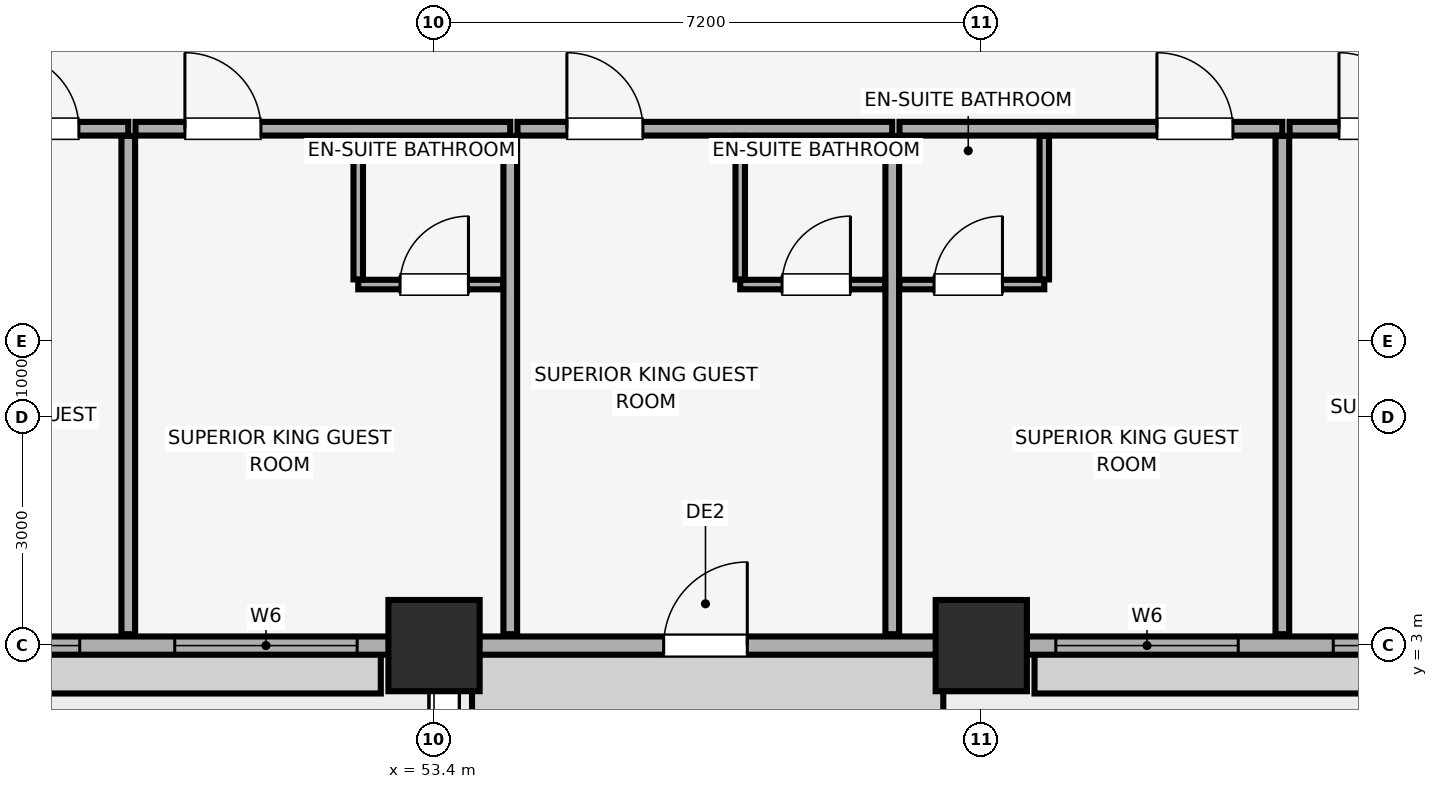
"""IFC4 building model, lengths in metres.
Left out: names, types, materials, properties, quantities, classifications, styles, units other than length and angle.
Written with IfcOpenShell. Run it as: python <this file> out.ifc"""

import sys

from ifc_helpers import new_model, si_unit, direction, frame, frame_2d, origin, origin_2d, place, context, subcontext, project, spatial, rectangle, extrude, element, fill, save


model = new_model("IFC4")
c1 = context("Model", 3, precision=1e-05, world=origin(), true_north=direction((0.0, 1.0)))
c2 = subcontext(c1, "Body", "Model", "MODEL_VIEW")
j1 = project(units=[si_unit("LENGTHUNIT", "METRE"), si_unit("PLANEANGLEUNIT", "RADIAN")], contexts=[c1])
p1 = place(None, origin())
s1 = spatial("IfcSite", under=j1, at=p1, CompositionType="ELEMENT")
p2 = place(p1, origin())
s2 = spatial("IfcBuilding", under=s1, at=p2, CompositionType="ELEMENT")
p3 = place(p2, frame((0.0, 0.0, 135.35)))
s3 = spatial("IfcBuildingStorey", under=s2, at=p3, CompositionType="ELEMENT", Elevation=135.35)
for number, where, z_axis, x_axis in (
    (1, (53.4, 3.0, 0.0), (0.0, 0.0, 1.0), (1.0, 0.0, 0.0)),
    (2, (60.6, 3.0, 0.0), (0.0, 0.0, 1.0), (1.0, 0.0, 0.0)),
):
    element("IfcColumn", number, at=place(p3, frame(where, z_axis=z_axis, x_axis=x_axis)), inside=s3, PredefinedType="COLUMN", context=c2, shape_type="SweptSolid", body=[
        extrude(rectangle(XDim=1.2, YDim=1.2, at=origin_2d()), origin(), (0.0, 0.0, 1.0), 3.56),
    ])
p4 = place(p3, frame((7.0, 3.0, 0.0), z_axis=(0.0, 0.0, 1.0), x_axis=(1.0, 0.0, 0.0)))
e3 = element("IfcWall", 3, at=p4, inside=s3, PredefinedType="SOLIDWALL", context=c2, shape_type="SweptSolid", body=[
    extrude(rectangle(XDim=70.0, YDim=0.24, at=frame_2d((35.0, 0.0))), origin(), (0.0, 0.0, 1.0), 2.61),
])
p5 = place(p4, frame((19.517, 0.0, 0.0)))
e4 = element("IfcOpeningElement", 4, at=p5, cuts=e3, PredefinedType="OPENING", context=c2, shape_type="SweptSolid", body=[
    extrude(rectangle(XDim=1.1, YDim=2.15, at=frame_2d((0.55, 1.075))), frame((0.0, 0.13, 0.0), z_axis=(0.0, -1.0, 0.0), x_axis=(1.0, 0.0, 0.0)), (0.0, 0.0, 1.0), 0.26),
])
p6 = place(p4, frame((34.45, 0.0, 0.0)))
e5 = element("IfcOpeningElement", 5, at=p6, cuts=e3, PredefinedType="OPENING", context=c2, shape_type="SweptSolid", body=[
    extrude(rectangle(XDim=1.1, YDim=2.15, at=frame_2d((0.55, 1.075))), frame((0.0, 0.13, 0.0), z_axis=(0.0, -1.0, 0.0), x_axis=(1.0, 0.0, 0.0)), (0.0, 0.0, 1.0), 0.26),
])
p7 = place(p4, frame((49.421, 0.0, 0.0)))
e6 = element("IfcOpeningElement", 6, at=p7, cuts=e3, PredefinedType="OPENING", context=c2, shape_type="SweptSolid", body=[
    extrude(rectangle(XDim=1.1, YDim=2.15, at=frame_2d((0.55, 1.075))), frame((0.0, 0.13, 0.0), z_axis=(0.0, -1.0, 0.0), x_axis=(1.0, 0.0, 0.0)), (0.0, 0.0, 1.0), 0.26),
])
p8 = place(p4, frame((5.2, 0.0, 0.85)))
e7 = element("IfcOpeningElement", 7, at=p8, cuts=e3, PredefinedType="OPENING", context=c2, shape_type="SweptSolid", body=[
    extrude(rectangle(XDim=1.5, YDim=1.4, at=frame_2d((0.75, 0.7))), frame((0.0, 0.13, 0.0), z_axis=(0.0, -1.0, 0.0), x_axis=(1.0, 0.0, 0.0)), (0.0, 0.0, 1.0), 0.26),
])
p9 = place(p4, frame((10.163, 0.0, 0.85)))
e8 = element("IfcOpeningElement", 8, at=p9, cuts=e3, PredefinedType="OPENING", context=c2, shape_type="SweptSolid", body=[
    extrude(rectangle(XDim=1.5, YDim=1.4, at=frame_2d((0.75, 0.7))), frame((0.0, 0.13, 0.0), z_axis=(0.0, -1.0, 0.0), x_axis=(1.0, 0.0, 0.0)), (0.0, 0.0, 1.0), 0.26),
])
p10 = place(p4, frame((12.913, 0.0, 0.85)))
e9 = element("IfcOpeningElement", 9, at=p10, cuts=e3, PredefinedType="OPENING", context=c2, shape_type="SweptSolid", body=[
    extrude(rectangle(XDim=2.4, YDim=1.5, at=frame_2d((1.2, 0.75))), frame((0.0, 0.13, 0.0), z_axis=(0.0, -1.0, 0.0), x_axis=(1.0, 0.0, 0.0)), (0.0, 0.0, 1.0), 0.26),
])
p11 = place(p4, frame((24.45, 0.0, 0.85)))
e10 = element("IfcOpeningElement", 10, at=p11, cuts=e3, PredefinedType="OPENING", context=c2, shape_type="SweptSolid", body=[
    extrude(rectangle(XDim=2.4, YDim=1.5, at=frame_2d((1.2, 0.75))), frame((0.0, 0.13, 0.0), z_axis=(0.0, -1.0, 0.0), x_axis=(1.0, 0.0, 0.0)), (0.0, 0.0, 1.0), 0.26),
])
p12 = place(p4, frame((28.101, 0.0, 0.85)))
e11 = element("IfcOpeningElement", 11, at=p12, cuts=e3, PredefinedType="OPENING", context=c2, shape_type="SweptSolid", body=[
    extrude(rectangle(XDim=1.5, YDim=1.4, at=frame_2d((0.75, 0.7))), frame((0.0, 0.13, 0.0), z_axis=(0.0, -1.0, 0.0), x_axis=(1.0, 0.0, 0.0)), (0.0, 0.0, 1.0), 0.26),
])
p13 = place(p4, frame((40.239, 0.0, 0.85)))
e12 = element("IfcOpeningElement", 12, at=p13, cuts=e3, PredefinedType="OPENING", context=c2, shape_type="SweptSolid", body=[
    extrude(rectangle(XDim=1.5, YDim=1.4, at=frame_2d((0.75, 0.7))), frame((0.0, 0.13, 0.0), z_axis=(0.0, -1.0, 0.0), x_axis=(1.0, 0.0, 0.0)), (0.0, 0.0, 1.0), 0.26),
])
p14 = place(p4, frame((42.989, 0.0, 0.85)))
e13 = element("IfcOpeningElement", 13, at=p14, cuts=e3, PredefinedType="OPENING", context=c2, shape_type="SweptSolid", body=[
    extrude(rectangle(XDim=2.4, YDim=1.5, at=frame_2d((1.2, 0.75))), frame((0.0, 0.13, 0.0), z_axis=(0.0, -1.0, 0.0), x_axis=(1.0, 0.0, 0.0)), (0.0, 0.0, 1.0), 0.26),
])
p15 = place(p4, frame((54.581, 0.0, 0.85)))
e14 = element("IfcOpeningElement", 14, at=p15, cuts=e3, PredefinedType="OPENING", context=c2, shape_type="SweptSolid", body=[
    extrude(rectangle(XDim=2.4, YDim=1.5, at=frame_2d((1.2, 0.75))), frame((0.0, 0.13, 0.0), z_axis=(0.0, -1.0, 0.0), x_axis=(1.0, 0.0, 0.0)), (0.0, 0.0, 1.0), 0.26),
])
p16 = place(p4, frame((58.23, 0.0, 0.85)))
e15 = element("IfcOpeningElement", 15, at=p16, cuts=e3, PredefinedType="OPENING", context=c2, shape_type="SweptSolid", body=[
    extrude(rectangle(XDim=1.5, YDim=1.4, at=frame_2d((0.75, 0.7))), frame((0.0, 0.13, 0.0), z_axis=(0.0, -1.0, 0.0), x_axis=(1.0, 0.0, 0.0)), (0.0, 0.0, 1.0), 0.26),
])
p17 = place(p4, frame((63.3, 0.0, 0.85)))
e16 = element("IfcOpeningElement", 16, at=p17, cuts=e3, PredefinedType="OPENING", context=c2, shape_type="SweptSolid", body=[
    extrude(rectangle(XDim=1.5, YDim=1.4, at=frame_2d((0.75, 0.7))), frame((0.0, 0.13, 0.0), z_axis=(0.0, -1.0, 0.0), x_axis=(1.0, 0.0, 0.0)), (0.0, 0.0, 1.0), 0.26),
])
p18 = place(p3, frame((44.447, 9.8, 0.0), z_axis=(0.0, 0.0, 1.0), x_axis=(1.0, 0.0, 0.0)))
e17 = element("IfcWall", 17, at=p18, inside=s3, PredefinedType="PARTITIONING", context=c2, shape_type="SweptSolid", body=[
    extrude(rectangle(XDim=4.93, YDim=0.18, at=frame_2d((2.465, 0.0))), origin(), (0.0, 0.0, 1.0), 3.56),
])
p19 = place(p18, frame((3.281, 0.0, 0.0)))
e18 = element("IfcOpeningElement", 18, at=p19, cuts=e17, PredefinedType="OPENING", context=c2, shape_type="SweptSolid", body=[
    extrude(rectangle(XDim=1.0, YDim=2.15, at=frame_2d((0.5, 1.075))), frame((0.0, 0.1, 0.0), z_axis=(0.0, -1.0, 0.0), x_axis=(1.0, 0.0, 0.0)), (0.0, 0.0, 1.0), 0.2),
])
p20 = place(p3, frame((49.378, 3.15, 0.0), z_axis=(0.0, 0.0, 1.0), x_axis=(0.0, 1.0, 0.0)))
e19 = element("IfcWall", 19, at=p20, inside=s3, PredefinedType="PARTITIONING", context=c2, shape_type="SweptSolid", body=[
    extrude(rectangle(XDim=6.555, YDim=0.18, at=frame_2d((3.278, 0.0))), origin(), (0.0, 0.0, 1.0), 3.56),
])
p21 = place(p3, frame((49.473, 9.8, 0.0), z_axis=(0.0, 0.0, 1.0), x_axis=(1.0, 0.0, 0.0)))
e20 = element("IfcWall", 20, at=p21, inside=s3, PredefinedType="PARTITIONING", context=c2, shape_type="SweptSolid", body=[
    extrude(rectangle(XDim=4.93, YDim=0.18, at=frame_2d((2.465, 0.0))), origin(), (0.0, 0.0, 1.0), 3.56),
])
p22 = place(p21, frame((0.65, 0.0, 0.0)))
e21 = element("IfcOpeningElement", 21, at=p22, cuts=e20, PredefinedType="OPENING", context=c2, shape_type="SweptSolid", body=[
    extrude(rectangle(XDim=1.0, YDim=2.15, at=frame_2d((0.5, 1.075))), frame((0.0, 0.1, 0.0), z_axis=(0.0, -1.0, 0.0), x_axis=(1.0, 0.0, 0.0)), (0.0, 0.0, 1.0), 0.2),
])
p23 = place(p3, frame((54.403, 3.15, 0.0), z_axis=(0.0, 0.0, 1.0), x_axis=(0.0, 1.0, 0.0)))
e22 = element("IfcWall", 22, at=p23, inside=s3, PredefinedType="PARTITIONING", context=c2, shape_type="SweptSolid", body=[
    extrude(rectangle(XDim=6.555, YDim=0.18, at=frame_2d((3.278, 0.0))), origin(), (0.0, 0.0, 1.0), 3.56),
])
p24 = place(p3, frame((52.403, 7.75, 0.0), z_axis=(0.0, 0.0, 1.0), x_axis=(1.0, 0.0, 0.0)))
e23 = element("IfcWall", 23, at=p24, inside=s3, PredefinedType="PARTITIONING", context=c2, shape_type="SweptSolid", body=[
    extrude(rectangle(XDim=1.905, YDim=0.125, at=frame_2d((0.953, 0.0))), origin(), (0.0, 0.0, 1.0), 3.56),
])
p25 = place(p24, frame((0.55, 0.0, 0.0)))
e24 = element("IfcOpeningElement", 24, at=p25, cuts=e23, PredefinedType="OPENING", context=c2, shape_type="SweptSolid", body=[
    extrude(rectangle(XDim=0.9, YDim=2.1, at=frame_2d((0.45, 1.05))), frame((0.0, 0.073, 0.0), z_axis=(0.0, -1.0, 0.0), x_axis=(1.0, 0.0, 0.0)), (0.0, 0.0, 1.0), 0.145),
])
p26 = place(p3, frame((52.403, 7.817, 0.0), z_axis=(0.0, 0.0, 1.0), x_axis=(0.0, 1.0, 0.0)))
e25 = element("IfcWall", 25, at=p26, inside=s3, PredefinedType="PARTITIONING", context=c2, shape_type="SweptSolid", body=[
    extrude(rectangle(XDim=1.888, YDim=0.125, at=frame_2d((0.944, 0.0))), origin(), (0.0, 0.0, 1.0), 3.56),
])
p27 = place(p3, frame((54.498, 9.8, 0.0), z_axis=(0.0, 0.0, 1.0), x_axis=(1.0, 0.0, 0.0)))
e26 = element("IfcWall", 26, at=p27, inside=s3, PredefinedType="PARTITIONING", context=c2, shape_type="SweptSolid", body=[
    extrude(rectangle(XDim=4.93, YDim=0.18, at=frame_2d((2.465, 0.0))), origin(), (0.0, 0.0, 1.0), 3.56),
])
p28 = place(p27, frame((0.65, 0.0, 0.0)))
e27 = element("IfcOpeningElement", 27, at=p28, cuts=e26, PredefinedType="OPENING", context=c2, shape_type="SweptSolid", body=[
    extrude(rectangle(XDim=1.0, YDim=2.15, at=frame_2d((0.5, 1.075))), frame((0.0, 0.1, 0.0), z_axis=(0.0, -1.0, 0.0), x_axis=(1.0, 0.0, 0.0)), (0.0, 0.0, 1.0), 0.2),
])
p29 = place(p3, frame((59.428, 3.15, 0.0), z_axis=(0.0, 0.0, 1.0), x_axis=(0.0, 1.0, 0.0)))
e28 = element("IfcWall", 28, at=p29, inside=s3, PredefinedType="PARTITIONING", context=c2, shape_type="SweptSolid", body=[
    extrude(rectangle(XDim=6.555, YDim=0.18, at=frame_2d((3.278, 0.0))), origin(), (0.0, 0.0, 1.0), 3.56),
])
p30 = place(p3, frame((57.428, 7.75, 0.0), z_axis=(0.0, 0.0, 1.0), x_axis=(1.0, 0.0, 0.0)))
e29 = element("IfcWall", 29, at=p30, inside=s3, PredefinedType="PARTITIONING", context=c2, shape_type="SweptSolid", body=[
    extrude(rectangle(XDim=1.905, YDim=0.125, at=frame_2d((0.953, 0.0))), origin(), (0.0, 0.0, 1.0), 3.56),
])
p31 = place(p30, frame((0.55, 0.0, 0.0)))
e30 = element("IfcOpeningElement", 30, at=p31, cuts=e29, PredefinedType="OPENING", context=c2, shape_type="SweptSolid", body=[
    extrude(rectangle(XDim=0.9, YDim=2.1, at=frame_2d((0.45, 1.05))), frame((0.0, 0.073, 0.0), z_axis=(0.0, -1.0, 0.0), x_axis=(1.0, 0.0, 0.0)), (0.0, 0.0, 1.0), 0.145),
])
p32 = place(p3, frame((57.428, 7.817, 0.0), z_axis=(0.0, 0.0, 1.0), x_axis=(0.0, 1.0, 0.0)))
e31 = element("IfcWall", 31, at=p32, inside=s3, PredefinedType="PARTITIONING", context=c2, shape_type="SweptSolid", body=[
    extrude(rectangle(XDim=1.888, YDim=0.125, at=frame_2d((0.944, 0.0))), origin(), (0.0, 0.0, 1.0), 3.56),
])
p33 = place(p3, frame((59.523, 9.8, 0.0), z_axis=(0.0, 0.0, 1.0), x_axis=(1.0, 0.0, 0.0)))
e32 = element("IfcWall", 32, at=p33, inside=s3, PredefinedType="PARTITIONING", context=c2, shape_type="SweptSolid", body=[
    extrude(rectangle(XDim=5.037, YDim=0.18, at=frame_2d((2.519, 0.0))), origin(), (0.0, 0.0, 1.0), 3.56),
])
p34 = place(p33, frame((3.387, 0.0, 0.0)))
e33 = element("IfcOpeningElement", 33, at=p34, cuts=e32, PredefinedType="OPENING", context=c2, shape_type="SweptSolid", body=[
    extrude(rectangle(XDim=1.0, YDim=2.15, at=frame_2d((0.5, 1.075))), frame((0.0, 0.1, 0.0), z_axis=(0.0, -1.0, 0.0), x_axis=(1.0, 0.0, 0.0)), (0.0, 0.0, 1.0), 0.2),
])
p35 = place(p3, frame((64.561, 3.15, 0.0), z_axis=(0.0, 0.0, 1.0), x_axis=(0.0, 1.0, 0.0)))
e34 = element("IfcWall", 34, at=p35, inside=s3, PredefinedType="PARTITIONING", context=c2, shape_type="SweptSolid", body=[
    extrude(rectangle(XDim=6.555, YDim=0.18, at=frame_2d((3.278, 0.0))), origin(), (0.0, 0.0, 1.0), 3.56),
])
p36 = place(p3, frame((59.523, 7.75, 0.0), z_axis=(0.0, 0.0, 1.0), x_axis=(1.0, 0.0, 0.0)))
e35 = element("IfcWall", 35, at=p36, inside=s3, PredefinedType="PARTITIONING", context=c2, shape_type="SweptSolid", body=[
    extrude(rectangle(XDim=1.905, YDim=0.125, at=frame_2d((0.953, 0.0))), origin(), (0.0, 0.0, 1.0), 3.56),
])
p37 = place(p36, frame((0.455, 0.0, 0.0)))
e36 = element("IfcOpeningElement", 36, at=p37, cuts=e35, PredefinedType="OPENING", context=c2, shape_type="SweptSolid", body=[
    extrude(rectangle(XDim=0.9, YDim=2.1, at=frame_2d((0.45, 1.05))), frame((0.0, 0.073, 0.0), z_axis=(0.0, -1.0, 0.0), x_axis=(1.0, 0.0, 0.0)), (0.0, 0.0, 1.0), 0.145),
])
p38 = place(p3, frame((61.428, 7.817, 0.0), z_axis=(0.0, 0.0, 1.0), x_axis=(0.0, 1.0, 0.0)))
e37 = element("IfcWall", 37, at=p38, inside=s3, PredefinedType="PARTITIONING", context=c2, shape_type="SweptSolid", body=[
    extrude(rectangle(XDim=1.888, YDim=0.125, at=frame_2d((0.944, 0.0))), origin(), (0.0, 0.0, 1.0), 3.56),
])
p39 = place(p3, frame((64.656, 9.8, 0.0), z_axis=(0.0, 0.0, 1.0), x_axis=(1.0, 0.0, 0.0)))
e38 = element("IfcWall", 38, at=p39, inside=s3, PredefinedType="PARTITIONING", context=c2, shape_type="SweptSolid", body=[
    extrude(rectangle(XDim=5.144, YDim=0.18, at=frame_2d((2.572, 0.0))), origin(), (0.0, 0.0, 1.0), 3.56),
])
p40 = place(p39, frame((0.65, 0.0, 0.0)))
e39 = element("IfcOpeningElement", 39, at=p40, cuts=e38, PredefinedType="OPENING", context=c2, shape_type="SweptSolid", body=[
    extrude(rectangle(XDim=1.0, YDim=2.15, at=frame_2d((0.5, 1.075))), frame((0.0, 0.1, 0.0), z_axis=(0.0, -1.0, 0.0), x_axis=(1.0, 0.0, 0.0)), (0.0, 0.0, 1.0), 0.2),
])
p41 = place(p7, origin())
e40 = element("IfcDoor", 40, at=p41, inside=s3, OperationType="SINGLE_SWING_RIGHT", PredefinedType="DOOR", context=c2, shape_type="SweptSolid", body=[
    extrude(rectangle(XDim=1.1, YDim=2.15, at=frame_2d((0.55, 1.075))), frame((0.0, 0.025, 0.0), z_axis=(0.0, -1.0, 0.0), x_axis=(1.0, 0.0, 0.0)), (0.0, 0.0, 1.0), 0.05),
])
fill(e6, e40)
p42 = place(p13, origin())
e41 = element("IfcWindow", 41, at=p42, inside=s3, PartitioningType="SINGLE_PANEL", PredefinedType="WINDOW", context=c2, shape_type="SweptSolid", body=[
    extrude(rectangle(XDim=1.5, YDim=1.4, at=frame_2d((0.75, 0.7))), frame((0.0, 0.03, 0.0), z_axis=(0.0, -1.0, 0.0), x_axis=(1.0, 0.0, 0.0)), (0.0, 0.0, 1.0), 0.06),
])
fill(e12, e41)
p43 = place(p14, origin())
e42 = element("IfcWindow", 42, at=p43, inside=s3, PartitioningType="SINGLE_PANEL", PredefinedType="WINDOW", context=c2, shape_type="SweptSolid", body=[
    extrude(rectangle(XDim=2.4, YDim=1.5, at=frame_2d((1.2, 0.75))), frame((0.0, 0.03, 0.0), z_axis=(0.0, -1.0, 0.0), x_axis=(1.0, 0.0, 0.0)), (0.0, 0.0, 1.0), 0.06),
])
fill(e13, e42)
p44 = place(p15, origin())
e43 = element("IfcWindow", 43, at=p44, inside=s3, PartitioningType="SINGLE_PANEL", PredefinedType="WINDOW", context=c2, shape_type="SweptSolid", body=[
    extrude(rectangle(XDim=2.4, YDim=1.5, at=frame_2d((1.2, 0.75))), frame((0.0, 0.03, 0.0), z_axis=(0.0, -1.0, 0.0), x_axis=(1.0, 0.0, 0.0)), (0.0, 0.0, 1.0), 0.06),
])
fill(e14, e43)
p45 = place(p16, origin())
e44 = element("IfcWindow", 44, at=p45, inside=s3, PartitioningType="SINGLE_PANEL", PredefinedType="WINDOW", context=c2, shape_type="SweptSolid", body=[
    extrude(rectangle(XDim=1.5, YDim=1.4, at=frame_2d((0.75, 0.7))), frame((0.0, 0.03, 0.0), z_axis=(0.0, -1.0, 0.0), x_axis=(1.0, 0.0, 0.0)), (0.0, 0.0, 1.0), 0.06),
])
fill(e15, e44)
p46 = place(p19, origin())
e45 = element("IfcDoor", 45, at=p46, inside=s3, OperationType="SINGLE_SWING_LEFT", PredefinedType="DOOR", context=c2, shape_type="SweptSolid", body=[
    extrude(rectangle(XDim=1.0, YDim=2.15, at=frame_2d((0.5, 1.075))), frame((0.0, 0.025, 0.0), z_axis=(0.0, -1.0, 0.0), x_axis=(1.0, 0.0, 0.0)), (0.0, 0.0, 1.0), 0.05),
])
fill(e18, e45)
p47 = place(p22, origin())
e46 = element("IfcDoor", 46, at=p47, inside=s3, OperationType="SINGLE_SWING_LEFT", PredefinedType="DOOR", context=c2, shape_type="SweptSolid", body=[
    extrude(rectangle(XDim=1.0, YDim=2.15, at=frame_2d((0.5, 1.075))), frame((0.0, 0.025, 0.0), z_axis=(0.0, -1.0, 0.0), x_axis=(1.0, 0.0, 0.0)), (0.0, 0.0, 1.0), 0.05),
])
fill(e21, e46)
p48 = place(p25, origin())
e47 = element("IfcDoor", 47, at=p48, inside=s3, OperationType="SINGLE_SWING_RIGHT", PredefinedType="DOOR", context=c2, shape_type="SweptSolid", body=[
    extrude(rectangle(XDim=0.9, YDim=2.1, at=frame_2d((0.45, 1.05))), frame((0.0, 0.025, 0.0), z_axis=(0.0, -1.0, 0.0), x_axis=(1.0, 0.0, 0.0)), (0.0, 0.0, 1.0), 0.05),
])
fill(e24, e47)
p49 = place(p28, origin())
e48 = element("IfcDoor", 48, at=p49, inside=s3, OperationType="SINGLE_SWING_LEFT", PredefinedType="DOOR", context=c2, shape_type="SweptSolid", body=[
    extrude(rectangle(XDim=1.0, YDim=2.15, at=frame_2d((0.5, 1.075))), frame((0.0, 0.025, 0.0), z_axis=(0.0, -1.0, 0.0), x_axis=(1.0, 0.0, 0.0)), (0.0, 0.0, 1.0), 0.05),
])
fill(e27, e48)
p50 = place(p31, origin())
e49 = element("IfcDoor", 49, at=p50, inside=s3, OperationType="SINGLE_SWING_RIGHT", PredefinedType="DOOR", context=c2, shape_type="SweptSolid", body=[
    extrude(rectangle(XDim=0.9, YDim=2.1, at=frame_2d((0.45, 1.05))), frame((0.0, 0.025, 0.0), z_axis=(0.0, -1.0, 0.0), x_axis=(1.0, 0.0, 0.0)), (0.0, 0.0, 1.0), 0.05),
])
fill(e30, e49)
p51 = place(p34, origin())
e50 = element("IfcDoor", 50, at=p51, inside=s3, OperationType="SINGLE_SWING_LEFT", PredefinedType="DOOR", context=c2, shape_type="SweptSolid", body=[
    extrude(rectangle(XDim=1.0, YDim=2.15, at=frame_2d((0.5, 1.075))), frame((0.0, 0.025, 0.0), z_axis=(0.0, -1.0, 0.0), x_axis=(1.0, 0.0, 0.0)), (0.0, 0.0, 1.0), 0.05),
])
fill(e33, e50)
p52 = place(p37, origin())
e51 = element("IfcDoor", 51, at=p52, inside=s3, OperationType="SINGLE_SWING_RIGHT", PredefinedType="DOOR", context=c2, shape_type="SweptSolid", body=[
    extrude(rectangle(XDim=0.9, YDim=2.1, at=frame_2d((0.45, 1.05))), frame((0.0, 0.025, 0.0), z_axis=(0.0, -1.0, 0.0), x_axis=(1.0, 0.0, 0.0)), (0.0, 0.0, 1.0), 0.05),
])
fill(e36, e51)
p53 = place(p40, origin())
e52 = element("IfcDoor", 52, at=p53, inside=s3, OperationType="SINGLE_SWING_LEFT", PredefinedType="DOOR", context=c2, shape_type="SweptSolid", body=[
    extrude(rectangle(XDim=1.0, YDim=2.15, at=frame_2d((0.5, 1.075))), frame((0.0, 0.025, 0.0), z_axis=(0.0, -1.0, 0.0), x_axis=(1.0, 0.0, 0.0)), (0.0, 0.0, 1.0), 0.05),
])
fill(e39, e52)
save(model, sys.argv[1])
